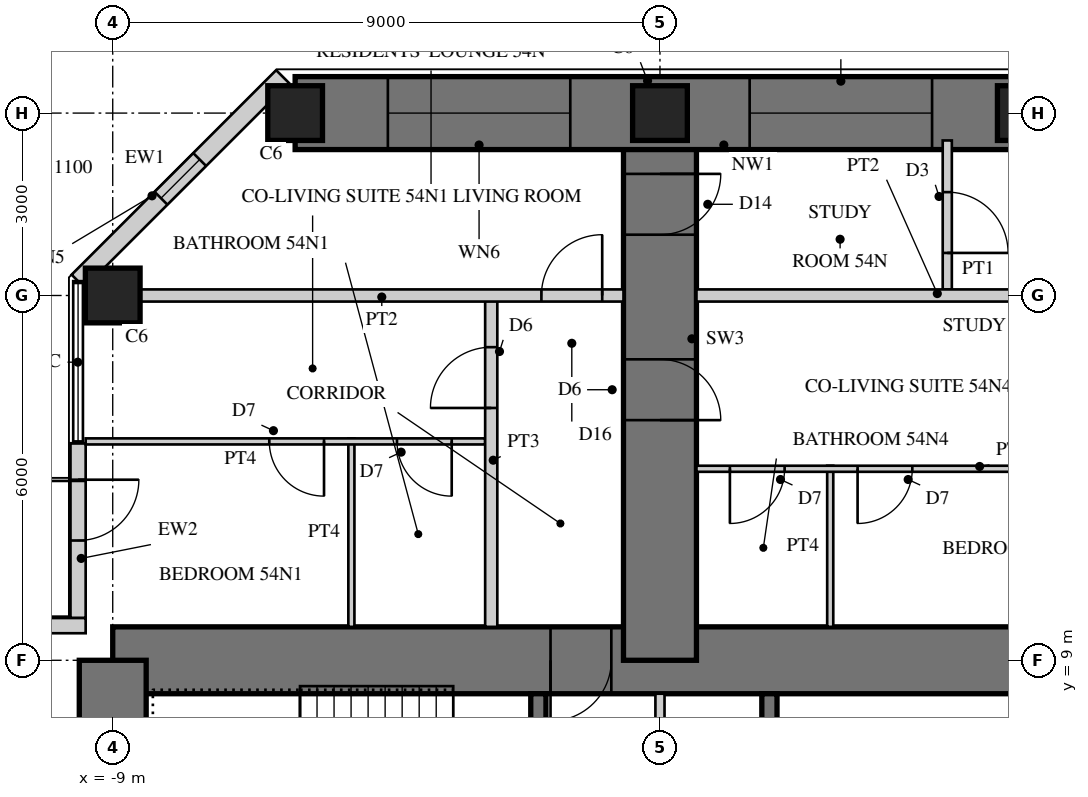
"""IFC4 building model, lengths in metres.
Left out: names, types, materials, properties, quantities, classifications, styles, units other than length and angle.
Written with IfcOpenShell. Run it as: python <this file> out.ifc"""

import sys

from ifc_helpers import new_model, si_unit, direction, frame, frame_2d, origin, origin_2d, place, context, subcontext, project, spatial, rectangle, hollow_rectangle, extrude, element, fill, save


model = new_model("IFC4")
c1 = context("Model", 3, precision=1e-05, world=origin(), true_north=direction((0.0, 1.0)))
c2 = subcontext(c1, "Body", "Model", "MODEL_VIEW")
j1 = project(units=[si_unit("LENGTHUNIT", "METRE"), si_unit("PLANEANGLEUNIT", "RADIAN")], contexts=[c1])
p1 = place(None, origin())
s1 = spatial("IfcSite", under=j1, at=p1, CompositionType="ELEMENT")
p2 = place(p1, origin())
s2 = spatial("IfcBuilding", under=s1, at=p2, CompositionType="ELEMENT")
p3 = place(p2, frame((0.0, 0.0, 213.7)))
s3 = spatial("IfcBuildingStorey", under=s2, at=p3, CompositionType="ELEMENT", Elevation=213.7)
p4 = place(p3, frame((9.0, 9.0, 0.0), z_axis=(0.0, 0.0, 1.0), x_axis=(-1.0, 0.0, 0.0)))
e1 = element("IfcWall", 1, at=p4, inside=s3, PredefinedType="SHEAR", context=c2, shape_type="SweptSolid", body=[
    extrude(rectangle(XDim=18.0, YDim=1.1, at=frame_2d((9.0, 0.0))), origin(), (0.0, 0.0, 1.0), 3.4),
])
p5 = place(p4, frame((9.8, 0.0, 0.0)))
e2 = element("IfcOpeningElement", 2, at=p5, cuts=e1, PredefinedType="OPENING", context=c2, shape_type="SweptSolid", body=[
    extrude(rectangle(XDim=1.0, YDim=2.4, at=frame_2d((0.5, 1.2))), frame((0.0, 0.56, 0.0), z_axis=(0.0, -1.0, 0.0), x_axis=(1.0, 0.0, 0.0)), (0.0, 0.0, 1.0), 1.12),
])
p6 = place(p3, frame((-9.0, 9.0, 0.0), z_axis=(0.0, 0.0, 1.0), x_axis=(0.0, -1.0, 0.0)))
e3 = element("IfcWall", 3, at=p6, inside=s3, PredefinedType="SHEAR", context=c2, shape_type="SweptSolid", body=[
    extrude(rectangle(XDim=18.0, YDim=1.1, at=frame_2d((9.0, 0.0))), origin(), (0.0, 0.0, 1.0), 3.4),
])
p7 = place(p6, frame((9.8, 0.0, 0.0)))
e4 = element("IfcOpeningElement", 4, at=p7, cuts=e3, PredefinedType="OPENING", context=c2, shape_type="SweptSolid", body=[
    extrude(rectangle(XDim=1.0, YDim=2.4, at=frame_2d((0.5, 1.2))), frame((0.0, 0.56, 0.0), z_axis=(0.0, -1.0, 0.0), x_axis=(1.0, 0.0, 0.0)), (0.0, 0.0, 1.0), 1.12),
])
p8 = place(p3, frame((1.8, 1.875, 0.0), z_axis=(0.0, 0.0, 1.0), x_axis=(0.0, 1.0, 0.0)))
e5 = element("IfcWall", 5, at=p8, inside=s3, PredefinedType="SHEAR", context=c2, shape_type="SweptSolid", body=[
    extrude(rectangle(XDim=6.575, YDim=0.25, at=frame_2d((3.288, 0.0))), origin(), (0.0, 0.0, 1.0), 3.4),
])
p9 = place(p8, frame((1.875, 0.0, 0.0)))
e6 = element("IfcOpeningElement", 6, at=p9, cuts=e5, PredefinedType="OPENING", context=c2, shape_type="SweptSolid", body=[
    extrude(rectangle(XDim=1.6, YDim=2.4, at=frame_2d((0.8, 1.2))), frame((0.0, 0.135, 0.0), z_axis=(0.0, -1.0, 0.0), x_axis=(1.0, 0.0, 0.0)), (0.0, 0.0, 1.0), 0.27),
])
p10 = place(p3, frame((-2.0, 1.675, 0.0), z_axis=(0.0, 0.0, 1.0), x_axis=(0.0, 1.0, 0.0)))
e7 = element("IfcWall", 7, at=p10, inside=s3, PredefinedType="SHEAR", context=c2, shape_type="SweptSolid", body=[
    extrude(rectangle(XDim=6.775, YDim=0.25, at=frame_2d((3.387, 0.0))), origin(), (0.0, 0.0, 1.0), 3.4),
])
p11 = place(p10, frame((0.725, 0.0, 0.0)))
e8 = element("IfcOpeningElement", 8, at=p11, cuts=e7, PredefinedType="OPENING", context=c2, shape_type="SweptSolid", body=[
    extrude(rectangle(XDim=1.0, YDim=2.1, at=frame_2d((0.5, 1.05))), frame((0.0, 0.135, 0.0), z_axis=(0.0, -1.0, 0.0), x_axis=(1.0, 0.0, 0.0)), (0.0, 0.0, 1.0), 0.27),
])
p12 = place(p3, frame((0.0, 9.0, 0.0), z_axis=(0.0, 0.0, 1.0), x_axis=(0.0, 1.0, 0.0)))
e9 = element("IfcWall", 9, at=p12, inside=s3, PredefinedType="SHEAR", context=c2, shape_type="SweptSolid", body=[
    extrude(rectangle(XDim=9.0, YDim=1.2, at=frame_2d((4.5, 0.0))), origin(), (0.0, 0.0, 1.0), 3.4),
])
p13 = place(p12, frame((3.95, 0.0, 0.0)))
e10 = element("IfcOpeningElement", 10, at=p13, cuts=e9, PredefinedType="OPENING", context=c2, shape_type="SweptSolid", body=[
    extrude(rectangle(XDim=1.0, YDim=2.15, at=frame_2d((0.5, 1.075))), frame((0.0, 0.61, 0.0), z_axis=(0.0, -1.0, 0.0), x_axis=(1.0, 0.0, 0.0)), (0.0, 0.0, 1.0), 1.22),
])
p14 = place(p12, frame((7.0, 0.0, 0.0)))
e11 = element("IfcOpeningElement", 11, at=p14, cuts=e9, PredefinedType="OPENING", context=c2, shape_type="SweptSolid", body=[
    extrude(rectangle(XDim=1.0, YDim=2.2, at=frame_2d((0.5, 1.1))), frame((0.0, 0.61, 0.0), z_axis=(0.0, -1.0, 0.0), x_axis=(1.0, 0.0, 0.0)), (0.0, 0.0, 1.0), 1.22),
])
p15 = place(p3, frame((6.0, 18.0, 0.0), z_axis=(0.0, 0.0, 1.0), x_axis=(-1.0, 0.0, 0.0)))
e12 = element("IfcWall", 12, at=p15, inside=s3, PredefinedType="SHEAR", context=c2, shape_type="SweptSolid", body=[
    extrude(rectangle(XDim=12.0, YDim=1.2, at=frame_2d((6.0, 0.0))), origin(), (0.0, 0.0, 1.0), 3.4),
])
p16 = place(p15, frame((1.525, 0.0, 0.6)))
e13 = element("IfcOpeningElement", 13, at=p16, cuts=e12, PredefinedType="OPENING", context=c2, shape_type="SweptSolid", body=[
    extrude(rectangle(XDim=3.0, YDim=2.4, at=frame_2d((1.5, 1.2))), frame((0.0, 0.61, 0.0), z_axis=(0.0, -1.0, 0.0), x_axis=(1.0, 0.0, 0.0)), (0.0, 0.0, 1.0), 1.22),
])
p17 = place(p15, frame((7.475, 0.0, 0.6)))
e14 = element("IfcOpeningElement", 14, at=p17, cuts=e12, PredefinedType="OPENING", context=c2, shape_type="SweptSolid", body=[
    extrude(rectangle(XDim=3.0, YDim=2.4, at=frame_2d((1.5, 1.2))), frame((0.0, 0.61, 0.0), z_axis=(0.0, -1.0, 0.0), x_axis=(1.0, 0.0, 0.0)), (0.0, 0.0, 1.0), 1.22),
])
for number, where, z_axis, x_axis in (
    (15, (-9.0, 15.0, 0.0), (0.0, 0.0, 1.0), (1.0, 0.0, 0.0)),
    (16, (6.0, 18.0, 0.0), (0.0, 0.0, 1.0), (1.0, 0.0, 0.0)),
    (17, (0.0, 18.0, 0.0), (0.0, 0.0, 1.0), (1.0, 0.0, 0.0)),
    (18, (-6.0, 18.0, 0.0), (0.0, 0.0, 1.0), (1.0, 0.0, 0.0)),
):
    element("IfcColumn", number, at=place(p3, frame(where, z_axis=z_axis, x_axis=x_axis)), inside=s3, PredefinedType="COLUMN", context=c2, shape_type="SweptSolid", body=[
        extrude(rectangle(XDim=0.9, YDim=0.9, at=origin_2d()), origin(), (0.0, 0.0, 1.0), 3.4),
    ])
p18 = place(p3, frame((-6.206, 18.6, 0.0), z_axis=(0.0, 0.0, 1.0), x_axis=(-0.707106781187, -0.707106781187, 0.0)))
e19 = element("IfcWall", 19, at=p18, inside=s3, PredefinedType="SOLIDWALL", context=c2, shape_type="SweptSolid", body=[
    extrude(rectangle(XDim=4.757, YDim=0.3, at=frame_2d((2.379, 0.0))), origin(), (0.0, 0.0, 1.0), 3.15),
])
p19 = place(p18, frame((1.929, 0.0, 0.3)))
e20 = element("IfcOpeningElement", 20, at=p19, cuts=e19, PredefinedType="OPENING", context=c2, shape_type="SweptSolid", body=[
    extrude(rectangle(XDim=0.9, YDim=2.4, at=frame_2d((0.45, 1.2))), frame((0.0, 0.16, 0.0), z_axis=(0.0, -1.0, 0.0), x_axis=(1.0, 0.0, 0.0)), (0.0, 0.0, 1.0), 0.32),
])
p20 = place(p3, frame((-9.57, 12.57, 0.0), z_axis=(0.0, 0.0, 1.0), x_axis=(0.0, -1.0, 0.0)))
e21 = element("IfcWall", 21, at=p20, inside=s3, PredefinedType="SOLIDWALL", context=c2, shape_type="SweptSolid", body=[
    extrude(rectangle(XDim=2.875, YDim=0.25, at=frame_2d((1.438, 0.0))), origin(), (0.0, 0.0, 1.0), 3.15),
])
p21 = place(p20, frame((0.6, 0.0, 0.0)))
e22 = element("IfcOpeningElement", 22, at=p21, cuts=e21, PredefinedType="OPENING", context=c2, shape_type="SweptSolid", body=[
    extrude(rectangle(XDim=1.0, YDim=2.2, at=frame_2d((0.5, 1.1))), frame((0.0, 0.135, 0.0), z_axis=(0.0, -1.0, 0.0), x_axis=(1.0, 0.0, 0.0)), (0.0, 0.0, 1.0), 0.27),
])
p22 = place(p3, frame((-9.445, 9.57, 0.0), z_axis=(0.0, 0.0, 1.0), x_axis=(-1.0, 0.0, 0.0)))
e23 = element("IfcWall", 23, at=p22, inside=s3, PredefinedType="SOLIDWALL", context=c2, shape_type="SweptSolid", body=[
    extrude(rectangle(XDim=3.125, YDim=0.25, at=frame_2d((1.562, 0.0))), origin(), (0.0, 0.0, 1.0), 3.15),
])
p23 = place(p22, frame((0.6, 0.0, 0.0)))
e24 = element("IfcOpeningElement", 24, at=p23, cuts=e23, PredefinedType="OPENING", context=c2, shape_type="SweptSolid", body=[
    extrude(rectangle(XDim=1.0, YDim=2.2, at=frame_2d((0.5, 1.1))), frame((0.0, 0.135, 0.0), z_axis=(0.0, -1.0, 0.0), x_axis=(1.0, 0.0, 0.0)), (0.0, 0.0, 1.0), 0.27),
])
p24 = place(p3, frame((0.0, 5.675, 0.0), z_axis=(0.0, 0.0, 1.0), x_axis=(0.0, 1.0, 0.0)))
e25 = element("IfcWall", 25, at=p24, inside=s3, PredefinedType="PARTITIONING", context=c2, shape_type="SweptSolid", body=[
    extrude(rectangle(XDim=2.775, YDim=0.15, at=frame_2d((1.387, 0.0))), origin(), (0.0, 0.0, 1.0), 3.15),
])
p25 = place(p24, frame((0.4, 0.0, 0.0)))
e26 = element("IfcOpeningElement", 26, at=p25, cuts=e25, PredefinedType="OPENING", context=c2, shape_type="SweptSolid", body=[
    extrude(rectangle(XDim=1.0, YDim=2.1, at=frame_2d((0.5, 1.05))), frame((0.0, 0.085, 0.0), z_axis=(0.0, -1.0, 0.0), x_axis=(1.0, 0.0, 0.0)), (0.0, 0.0, 1.0), 0.17),
])
p26 = place(p3, frame((-5.075, 9.55, 0.0), z_axis=(0.0, 0.0, 1.0), x_axis=(0.0, 1.0, 0.0)))
e27 = element("IfcWall", 27, at=p26, inside=s3, PredefinedType="PARTITIONING", context=c2, shape_type="SweptSolid", body=[
    extrude(rectangle(XDim=3.1, YDim=0.1, at=frame_2d((1.55, 0.0))), origin(), (0.0, 0.0, 1.0), 3.15),
])
p27 = place(p3, frame((-2.875, 12.6, 0.0), z_axis=(0.0, 0.0, 1.0), x_axis=(-1.0, 0.0, 0.0)))
e28 = element("IfcWall", 28, at=p27, inside=s3, PredefinedType="PARTITIONING", context=c2, shape_type="SweptSolid", body=[
    extrude(rectangle(XDim=6.57, YDim=0.1, at=frame_2d((3.285, 0.0))), origin(), (0.0, 0.0, 1.0), 3.15),
])
p28 = place(p27, frame((0.55, 0.0, 0.0)))
e29 = element("IfcOpeningElement", 29, at=p28, cuts=e28, PredefinedType="OPENING", context=c2, shape_type="SweptSolid", body=[
    extrude(rectangle(XDim=0.9, YDim=2.1, at=frame_2d((0.45, 1.05))), frame((0.0, 0.06, 0.0), z_axis=(0.0, -1.0, 0.0), x_axis=(1.0, 0.0, 0.0)), (0.0, 0.0, 1.0), 0.12),
])
p29 = place(p27, frame((2.65, 0.0, 0.0)))
e30 = element("IfcOpeningElement", 30, at=p29, cuts=e28, PredefinedType="OPENING", context=c2, shape_type="SweptSolid", body=[
    extrude(rectangle(XDim=0.9, YDim=2.1, at=frame_2d((0.45, 1.05))), frame((0.0, 0.06, 0.0), z_axis=(0.0, -1.0, 0.0), x_axis=(1.0, 0.0, 0.0)), (0.0, 0.0, 1.0), 0.12),
])
p30 = place(p3, frame((2.8, 9.55, 0.0), z_axis=(0.0, 0.0, 1.0), x_axis=(0.0, 1.0, 0.0)))
e31 = element("IfcWall", 31, at=p30, inside=s3, PredefinedType="PARTITIONING", context=c2, shape_type="SweptSolid", body=[
    extrude(rectangle(XDim=2.65, YDim=0.1, at=frame_2d((1.325, 0.0))), origin(), (0.0, 0.0, 1.0), 3.15),
])
p31 = place(p3, frame((9.445, 12.15, 0.0), z_axis=(0.0, 0.0, 1.0), x_axis=(-1.0, 0.0, 0.0)))
e32 = element("IfcWall", 32, at=p31, inside=s3, PredefinedType="PARTITIONING", context=c2, shape_type="SweptSolid", body=[
    extrude(rectangle(XDim=8.845, YDim=0.1, at=frame_2d((4.422, 0.0))), origin(), (0.0, 0.0, 1.0), 3.15),
])
p32 = place(p31, frame((5.295, 0.0, 0.0)))
e33 = element("IfcOpeningElement", 33, at=p32, cuts=e32, PredefinedType="OPENING", context=c2, shape_type="SweptSolid", body=[
    extrude(rectangle(XDim=0.9, YDim=2.1, at=frame_2d((0.45, 1.05))), frame((0.0, 0.06, 0.0), z_axis=(0.0, -1.0, 0.0), x_axis=(1.0, 0.0, 0.0)), (0.0, 0.0, 1.0), 0.12),
])
p33 = place(p31, frame((7.395, 0.0, 0.0)))
e34 = element("IfcOpeningElement", 34, at=p33, cuts=e32, PredefinedType="OPENING", context=c2, shape_type="SweptSolid", body=[
    extrude(rectangle(XDim=0.9, YDim=2.1, at=frame_2d((0.45, 1.05))), frame((0.0, 0.06, 0.0), z_axis=(0.0, -1.0, 0.0), x_axis=(1.0, 0.0, 0.0)), (0.0, 0.0, 1.0), 0.12),
])
p34 = place(p3, frame((-2.775, 9.55, 0.0), z_axis=(0.0, 0.0, 1.0), x_axis=(0.0, 1.0, 0.0)))
e35 = element("IfcWall", 35, at=p34, inside=s3, PredefinedType="SOLIDWALL", context=c2, shape_type="SweptSolid", body=[
    extrude(rectangle(XDim=5.45, YDim=0.2, at=frame_2d((2.725, 0.0))), origin(), (0.0, 0.0, 1.0), 3.15),
])
p35 = place(p34, frame((3.6, 0.0, 0.0)))
e36 = element("IfcOpeningElement", 36, at=p35, cuts=e35, PredefinedType="OPENING", context=c2, shape_type="SweptSolid", body=[
    extrude(rectangle(XDim=1.0, YDim=2.15, at=frame_2d((0.5, 1.075))), frame((0.0, 0.11, 0.0), z_axis=(0.0, -1.0, 0.0), x_axis=(1.0, 0.0, 0.0)), (0.0, 0.0, 1.0), 0.22),
])
p36 = place(p3, frame((4.725, 15.1, 0.0), z_axis=(0.0, 0.0, 1.0), x_axis=(0.0, 1.0, 0.0)))
e37 = element("IfcWall", 37, at=p36, inside=s3, PredefinedType="PARTITIONING", context=c2, shape_type="SweptSolid", body=[
    extrude(rectangle(XDim=2.45, YDim=0.15, at=frame_2d((1.225, 0.0))), origin(), (0.0, 0.0, 1.0), 3.15),
])
p37 = place(p36, frame((0.6, 0.0, 0.0)))
e38 = element("IfcOpeningElement", 38, at=p37, cuts=e37, PredefinedType="OPENING", context=c2, shape_type="SweptSolid", body=[
    extrude(rectangle(XDim=1.0, YDim=2.1, at=frame_2d((0.5, 1.05))), frame((0.0, 0.085, 0.0), z_axis=(0.0, -1.0, 0.0), x_axis=(1.0, 0.0, 0.0)), (0.0, 0.0, 1.0), 0.17),
])
p38 = place(p3, frame((8.55, 15.0, 0.0), z_axis=(0.0, 0.0, 1.0), x_axis=(-1.0, 0.0, 0.0)))
e39 = element("IfcWall", 39, at=p38, inside=s3, PredefinedType="SOLIDWALL", context=c2, shape_type="SweptSolid", body=[
    extrude(rectangle(XDim=7.95, YDim=0.2, at=frame_2d((3.975, 0.0))), origin(), (0.0, 0.0, 1.0), 2.1),
])
p39 = place(p3, frame((-0.6, 15.0, 0.0), z_axis=(0.0, 0.0, 1.0), x_axis=(-1.0, 0.0, 0.0)))
e40 = element("IfcWall", 40, at=p39, inside=s3, PredefinedType="SOLIDWALL", context=c2, shape_type="SweptSolid", body=[
    extrude(rectangle(XDim=7.95, YDim=0.2, at=frame_2d((3.975, 0.0))), origin(), (0.0, 0.0, 1.0), 2.1),
])
p40 = place(p39, frame((0.35, 0.0, 0.0)))
e41 = element("IfcOpeningElement", 41, at=p40, cuts=e40, PredefinedType="OPENING", context=c2, shape_type="SweptSolid", body=[
    extrude(rectangle(XDim=1.0, YDim=2.0, at=frame_2d((0.5, 1.0))), frame((0.0, 0.11, 0.0), z_axis=(0.0, -1.0, 0.0), x_axis=(1.0, 0.0, 0.0)), (0.0, 0.0, 1.0), 0.22),
])
p41 = place(p16, origin())
e42 = element("IfcWindow", 42, at=p41, inside=s3, PartitioningType="SINGLE_PANEL", PredefinedType="WINDOW", context=c2, shape_type="SweptSolid", body=[
    extrude(hollow_rectangle(XDim=3.0, YDim=2.4, WallThickness=0.06, at=frame_2d((1.5, 1.2))), frame((0.0, 0.03, 0.0), z_axis=(0.0, -1.0, 0.0), x_axis=(1.0, 0.0, 0.0)), (0.0, 0.0, 1.0), 0.06),
    extrude(rectangle(XDim=2.879, YDim=2.279, at=frame_2d((1.5, 1.2))), frame((0.0, 0.03, 0.0), z_axis=(0.0, -1.0, 0.0), x_axis=(1.0, 0.0, 0.0)), (0.0, 0.0, 1.0), 0.06),
])
fill(e13, e42)
p42 = place(p17, origin())
e43 = element("IfcWindow", 43, at=p42, inside=s3, PartitioningType="SINGLE_PANEL", PredefinedType="WINDOW", context=c2, shape_type="SweptSolid", body=[
    extrude(hollow_rectangle(XDim=3.0, YDim=2.4, WallThickness=0.06, at=frame_2d((1.5, 1.2))), frame((0.0, 0.03, 0.0), z_axis=(0.0, -1.0, 0.0), x_axis=(1.0, 0.0, 0.0)), (0.0, 0.0, 1.0), 0.06),
    extrude(rectangle(XDim=2.879, YDim=2.279, at=frame_2d((1.5, 1.2))), frame((0.0, 0.03, 0.0), z_axis=(0.0, -1.0, 0.0), x_axis=(1.0, 0.0, 0.0)), (0.0, 0.0, 1.0), 0.06),
])
fill(e14, e43)
p43 = place(p19, origin())
e44 = element("IfcWindow", 44, at=p43, inside=s3, PartitioningType="SINGLE_PANEL", PredefinedType="WINDOW", context=c2, shape_type="SweptSolid", body=[
    extrude(hollow_rectangle(XDim=0.9, YDim=2.4, WallThickness=0.06, at=frame_2d((0.45, 1.2))), frame((0.0, 0.03, 0.0), z_axis=(0.0, -1.0, 0.0), x_axis=(1.0, 0.0, 0.0)), (0.0, 0.0, 1.0), 0.06),
    extrude(rectangle(XDim=0.779, YDim=2.279, at=frame_2d((0.45, 1.2))), frame((0.0, 0.03, 0.0), z_axis=(0.0, -1.0, 0.0), x_axis=(1.0, 0.0, 0.0)), (0.0, 0.0, 1.0), 0.06),
])
fill(e20, e44)
p44 = place(p21, origin())
e45 = element("IfcDoor", 45, at=p44, inside=s3, OperationType="SINGLE_SWING_LEFT", PredefinedType="DOOR", context=c2, shape_type="SweptSolid", body=[
    extrude(hollow_rectangle(XDim=1.0, YDim=2.2, WallThickness=0.06, at=frame_2d((0.5, 1.1))), frame((0.0, 0.025, 0.0), z_axis=(0.0, -1.0, 0.0), x_axis=(1.0, 0.0, 0.0)), (0.0, 0.0, 1.0), 0.05),
    extrude(rectangle(XDim=0.879, YDim=2.079, at=frame_2d((0.5, 1.1))), frame((0.0, 0.025, 0.0), z_axis=(0.0, -1.0, 0.0), x_axis=(1.0, 0.0, 0.0)), (0.0, 0.0, 1.0), 0.05),
])
fill(e22, e45)
p45 = place(p28, origin())
e46 = element("IfcDoor", 46, at=p45, inside=s3, OperationType="SINGLE_SWING_LEFT", PredefinedType="DOOR", context=c2, shape_type="SweptSolid", body=[
    extrude(rectangle(XDim=0.9, YDim=2.1, at=frame_2d((0.45, 1.05))), frame((0.0, 0.025, 0.0), z_axis=(0.0, -1.0, 0.0), x_axis=(1.0, 0.0, 0.0)), (0.0, 0.0, 1.0), 0.05),
])
fill(e29, e46)
p46 = place(p29, origin())
e47 = element("IfcDoor", 47, at=p46, inside=s3, OperationType="SINGLE_SWING_LEFT", PredefinedType="DOOR", context=c2, shape_type="SweptSolid", body=[
    extrude(rectangle(XDim=0.9, YDim=2.1, at=frame_2d((0.45, 1.05))), frame((0.0, 0.025, 0.0), z_axis=(0.0, -1.0, 0.0), x_axis=(1.0, 0.0, 0.0)), (0.0, 0.0, 1.0), 0.05),
])
fill(e30, e47)
p47 = place(p32, origin())
e48 = element("IfcDoor", 48, at=p47, inside=s3, OperationType="SINGLE_SWING_RIGHT", PredefinedType="DOOR", context=c2, shape_type="SweptSolid", body=[
    extrude(rectangle(XDim=0.9, YDim=2.1, at=frame_2d((0.45, 1.05))), frame((0.0, 0.025, 0.0), z_axis=(0.0, -1.0, 0.0), x_axis=(1.0, 0.0, 0.0)), (0.0, 0.0, 1.0), 0.05),
])
fill(e33, e48)
p48 = place(p33, origin())
e49 = element("IfcDoor", 49, at=p48, inside=s3, OperationType="SINGLE_SWING_RIGHT", PredefinedType="DOOR", context=c2, shape_type="SweptSolid", body=[
    extrude(rectangle(XDim=0.9, YDim=2.1, at=frame_2d((0.45, 1.05))), frame((0.0, 0.025, 0.0), z_axis=(0.0, -1.0, 0.0), x_axis=(1.0, 0.0, 0.0)), (0.0, 0.0, 1.0), 0.05),
])
fill(e34, e49)
p49 = place(p35, origin())
e50 = element("IfcDoor", 50, at=p49, inside=s3, OperationType="SINGLE_SWING_LEFT", PredefinedType="DOOR", context=c2, shape_type="SweptSolid", body=[
    extrude(rectangle(XDim=1.0, YDim=2.15, at=frame_2d((0.5, 1.075))), frame((0.0, 0.025, 0.0), z_axis=(0.0, -1.0, 0.0), x_axis=(1.0, 0.0, 0.0)), (0.0, 0.0, 1.0), 0.05),
])
fill(e36, e50)
p50 = place(p37, frame((1.0, 0.0, 0.0), z_axis=(0.0, 0.0, 1.0), x_axis=(-1.0, 0.0, 0.0)))
e51 = element("IfcDoor", 51, at=p50, inside=s3, OperationType="SINGLE_SWING_RIGHT", PredefinedType="DOOR", context=c2, shape_type="SweptSolid", body=[
    extrude(rectangle(XDim=1.0, YDim=2.1, at=frame_2d((0.5, 1.05))), frame((0.0, 0.025, 0.0), z_axis=(0.0, -1.0, 0.0), x_axis=(1.0, 0.0, 0.0)), (0.0, 0.0, 1.0), 0.05),
])
fill(e38, e51)
p51 = place(p40, frame((1.0, 0.0, 0.0), z_axis=(0.0, 0.0, 1.0), x_axis=(-1.0, 0.0, 0.0)))
e52 = element("IfcDoor", 52, at=p51, inside=s3, OperationType="SINGLE_SWING_RIGHT", PredefinedType="DOOR", context=c2, shape_type="SweptSolid", body=[
    extrude(rectangle(XDim=1.0, YDim=2.0, at=frame_2d((0.5, 1.0))), frame((0.0, 0.025, 0.0), z_axis=(0.0, -1.0, 0.0), x_axis=(1.0, 0.0, 0.0)), (0.0, 0.0, 1.0), 0.05),
])
fill(e41, e52)
p52 = place(p13, frame((1.0, 0.0, 0.0), z_axis=(0.0, 0.0, 1.0), x_axis=(-1.0, 0.0, 0.0)))
e53 = element("IfcDoor", 53, at=p52, inside=s3, OperationType="SINGLE_SWING_RIGHT", PredefinedType="DOOR", context=c2, shape_type="SweptSolid", body=[
    extrude(rectangle(XDim=1.0, YDim=2.15, at=frame_2d((0.5, 1.075))), frame((0.0, 0.025, 0.0), z_axis=(0.0, -1.0, 0.0), x_axis=(1.0, 0.0, 0.0)), (0.0, 0.0, 1.0), 0.05),
])
fill(e10, e53)
p53 = place(p14, frame((1.0, 0.0, 0.0), z_axis=(0.0, 0.0, 1.0), x_axis=(-1.0, 0.0, 0.0)))
e54 = element("IfcDoor", 54, at=p53, inside=s3, OperationType="SINGLE_SWING_LEFT", PredefinedType="DOOR", context=c2, shape_type="SweptSolid", body=[
    extrude(rectangle(XDim=1.0, YDim=2.2, at=frame_2d((0.5, 1.1))), frame((0.0, 0.025, 0.0), z_axis=(0.0, -1.0, 0.0), x_axis=(1.0, 0.0, 0.0)), (0.0, 0.0, 1.0), 0.05),
])
fill(e11, e54)
p54 = place(p5, origin())
e55 = element("IfcDoor", 55, at=p54, inside=s3, OperationType="SINGLE_SWING_RIGHT", PredefinedType="DOOR", context=c2, shape_type="SweptSolid", body=[
    extrude(rectangle(XDim=1.0, YDim=2.4, at=frame_2d((0.5, 1.2))), frame((0.0, 0.055, 0.0), z_axis=(0.0, -1.0, 0.0), x_axis=(1.0, 0.0, 0.0)), (0.0, 0.0, 1.0), 0.05),
])
fill(e2, e55)
save(model, sys.argv[1])
